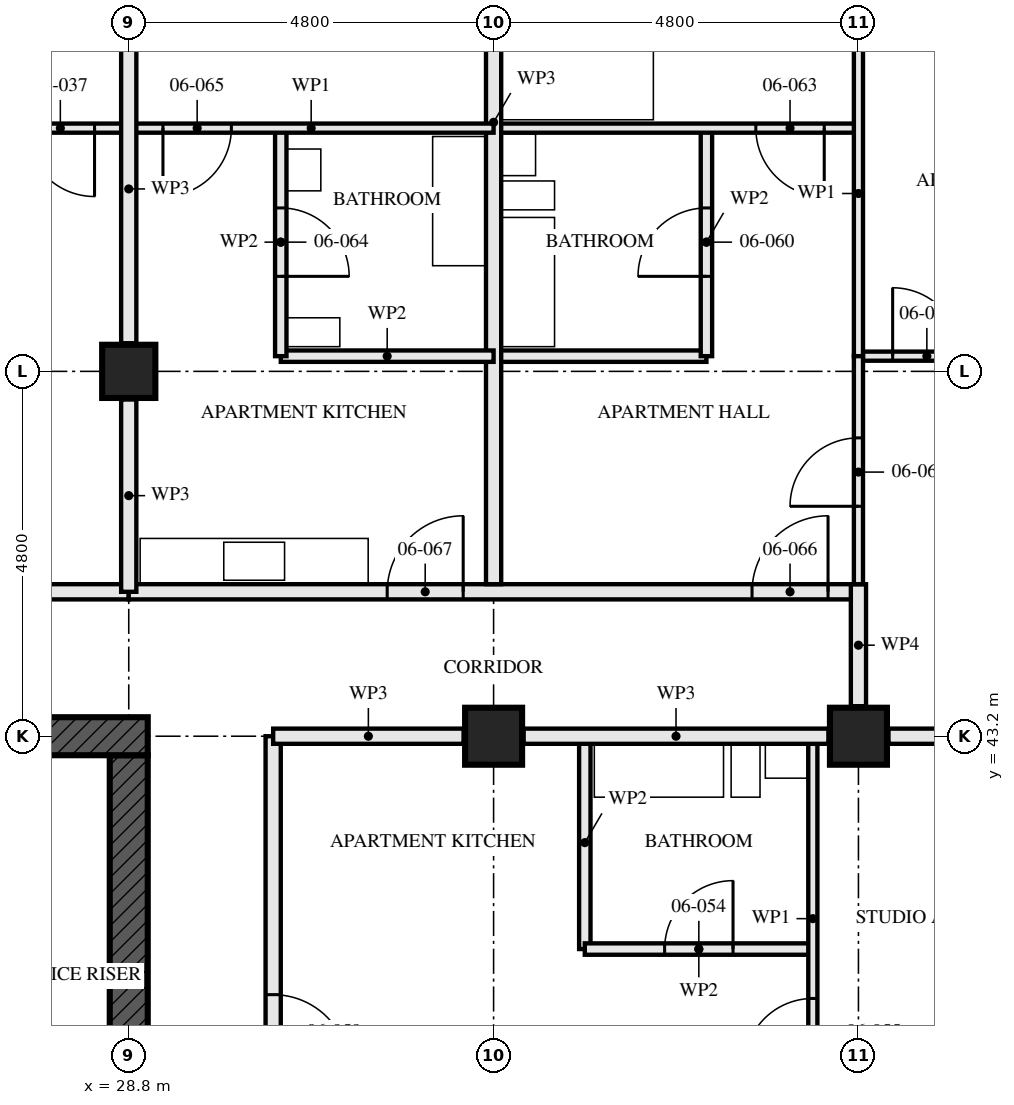
"""IFC4 building model, lengths in metres.
Left out: names, types, materials, properties, quantities, classifications, styles, units other than length and angle.
Written with IfcOpenShell. Run it as: python <this file> out.ifc"""

import sys

from ifc_helpers import new_model, si_unit, direction, frame, frame_2d, origin, origin_2d, place, context, subcontext, project, spatial, rectangle, hollow_rectangle, extrude, element, fill, save


model = new_model("IFC4")
c1 = context("Model", 3, precision=1e-05, world=origin(), true_north=direction((0.0, 1.0)))
c2 = subcontext(c1, "Body", "Model", "MODEL_VIEW")
j1 = project(units=[si_unit("LENGTHUNIT", "METRE"), si_unit("PLANEANGLEUNIT", "RADIAN")], contexts=[c1])
p1 = place(None, origin())
s1 = spatial("IfcSite", under=j1, at=p1, CompositionType="ELEMENT")
p2 = place(p1, origin())
s2 = spatial("IfcBuilding", under=s1, at=p2, CompositionType="ELEMENT")
p3 = place(p2, frame((0.0, 0.0, 27.0)))
s3 = spatial("IfcBuildingStorey", under=s2, at=p3, CompositionType="ELEMENT", Elevation=27.0)
p4 = place(p3, frame((28.8, 48.0, 0.0), z_axis=(0.0, 0.0, 1.0), x_axis=(1.0, 0.0, 0.0)))
e1 = element("IfcColumn", 1, at=p4, inside=s3, PredefinedType="COLUMN", context=c2, shape_type="SweptSolid", body=[
    extrude(hollow_rectangle(XDim=0.7, YDim=0.7, WallThickness=0.06, at=origin_2d()), origin(), (0.0, 0.0, 1.0), 3.5),
])
for number, where, z_axis, x_axis in (
    (2, (33.6, 43.2, 0.0), (0.0, 0.0, 1.0), (0.0, 1.0, 0.0)),
    (3, (38.4, 43.2, 0.0), (0.0, 0.0, 1.0), (0.0, 1.0, 0.0)),
):
    element("IfcColumn", number, at=place(p3, frame(where, z_axis=z_axis, x_axis=x_axis)), inside=s3, PredefinedType="COLUMN", context=c2, shape_type="SweptSolid", body=[
        extrude(hollow_rectangle(XDim=0.75, YDim=0.75, WallThickness=0.08, at=origin_2d()), origin(), (0.0, 0.0, 1.0), 3.5),
    ])
p5 = place(p3, frame((29.05, 43.2, -0.17), z_axis=(0.0, 0.0, 1.0), x_axis=(-1.0, 0.0, 0.0)))
e4 = element("IfcWall", 4, at=p5, inside=s3, PredefinedType="SHEAR", context=c2, shape_type="SweptSolid", body=[
    extrude(rectangle(XDim=14.9, YDim=0.5, at=frame_2d((7.45, 0.0))), origin(), (0.0, 0.0, 1.0), 3.5),
])
p6 = place(p5, frame((6.85, 0.0, 0.17)))
e5 = element("IfcOpeningElement", 5, at=p6, cuts=e4, PredefinedType="OPENING", context=c2, shape_type="SweptSolid", body=[
    extrude(rectangle(XDim=1.2, YDim=2.1, at=frame_2d((0.6, 1.05))), frame((0.0, 0.26, 0.0), z_axis=(0.0, -1.0, 0.0), x_axis=(1.0, 0.0, 0.0)), (0.0, 0.0, 1.0), 0.521),
])
p7 = place(p3, frame((28.8, 29.05, -0.17), z_axis=(0.0, 0.0, 1.0), x_axis=(0.0, 1.0, 0.0)))
e6 = element("IfcWall", 6, at=p7, inside=s3, PredefinedType="SHEAR", context=c2, shape_type="SweptSolid", body=[
    extrude(rectangle(XDim=13.9, YDim=0.5, at=frame_2d((6.95, 0.0))), origin(), (0.0, 0.0, 1.0), 3.5),
])
p8 = place(p7, frame((6.35, 0.0, 0.17)))
e7 = element("IfcOpeningElement", 7, at=p8, cuts=e6, PredefinedType="OPENING", context=c2, shape_type="SweptSolid", body=[
    extrude(rectangle(XDim=1.2, YDim=2.1, at=frame_2d((0.6, 1.05))), frame((0.0, 0.26, 0.0), z_axis=(0.0, -1.0, 0.0), x_axis=(1.0, 0.0, 0.0)), (0.0, 0.0, 1.0), 0.521),
])
p9 = place(p3, frame((28.8, 51.2, 0.0), z_axis=(0.0, 0.0, 1.0), x_axis=(-1.0, 0.0, 0.0)))
e8 = element("IfcWall", 8, at=p9, inside=s3, PredefinedType="PARTITIONING", context=c2, shape_type="SweptSolid", body=[
    extrude(rectangle(XDim=4.8, YDim=0.12, at=frame_2d((2.4, 0.0))), origin(), (0.0, 0.0, 1.0), 3.33),
])
p10 = place(p9, frame((0.45, 0.0, 0.0)))
e9 = element("IfcOpeningElement", 9, at=p10, cuts=e8, PredefinedType="OPENING", context=c2, shape_type="SweptSolid", body=[
    extrude(rectangle(XDim=0.9, YDim=2.1, at=frame_2d((0.45, 1.05))), frame((0.0, 0.071, 0.0), z_axis=(0.0, -1.0, 0.0), x_axis=(1.0, 0.0, 0.0)), (0.0, 0.0, 1.0), 0.141),
])
p11 = place(p3, frame((28.8, 45.1, 0.0), z_axis=(0.0, 0.0, 1.0), x_axis=(-1.0, 0.0, 0.0)))
e10 = element("IfcWall", 10, at=p11, inside=s3, PredefinedType="PARTITIONING", context=c2, shape_type="SweptSolid", body=[
    extrude(rectangle(XDim=14.4, YDim=0.2, at=frame_2d((7.2, 0.0))), origin(), (0.0, 0.0, 1.0), 3.33),
])
p12 = place(p11, frame((5.2, 0.0, 0.0)))
e11 = element("IfcOpeningElement", 11, at=p12, cuts=e10, PredefinedType="OPENING", context=c2, shape_type="SweptSolid", body=[
    extrude(rectangle(XDim=1.0, YDim=2.1, at=frame_2d((0.5, 1.05))), frame((0.0, 0.111, 0.0), z_axis=(0.0, -1.0, 0.0), x_axis=(1.0, 0.0, 0.0)), (0.0, 0.0, 1.0), 0.221),
])
p13 = place(p11, frame((10.0, 0.0, 0.0)))
e12 = element("IfcOpeningElement", 12, at=p13, cuts=e10, PredefinedType="OPENING", context=c2, shape_type="SweptSolid", body=[
    extrude(rectangle(XDim=1.0, YDim=2.1, at=frame_2d((0.5, 1.05))), frame((0.0, 0.111, 0.0), z_axis=(0.0, -1.0, 0.0), x_axis=(1.0, 0.0, 0.0)), (0.0, 0.0, 1.0), 0.221),
])
p14 = place(p3, frame((37.8, 40.4, 0.0), z_axis=(0.0, 0.0, 1.0), x_axis=(-1.0, 0.0, 0.0)))
e13 = element("IfcWall", 13, at=p14, inside=s3, PredefinedType="PARTITIONING", context=c2, shape_type="SweptSolid", body=[
    extrude(rectangle(XDim=3.0, YDim=0.15, at=frame_2d((1.5, 0.0))), origin(), (0.0, 0.0, 1.0), 3.33),
])
p15 = place(p14, frame((1.05, 0.0, 0.0)))
e14 = element("IfcOpeningElement", 14, at=p15, cuts=e13, PredefinedType="OPENING", context=c2, shape_type="SweptSolid", body=[
    extrude(rectangle(XDim=0.9, YDim=2.1, at=frame_2d((0.45, 1.05))), frame((0.0, 0.085, 0.0), z_axis=(0.0, -1.0, 0.0), x_axis=(1.0, 0.0, 0.0)), (0.0, 0.0, 1.0), 0.171),
])
p16 = place(p3, frame((34.8, 40.4, 0.0), z_axis=(0.0, 0.0, 1.0), x_axis=(0.0, 1.0, 0.0)))
e15 = element("IfcWall", 15, at=p16, inside=s3, PredefinedType="PARTITIONING", context=c2, shape_type="SweptSolid", body=[
    extrude(rectangle(XDim=2.8, YDim=0.15, at=frame_2d((1.4, 0.0))), origin(), (0.0, 0.0, 1.0), 3.33),
])
p17 = place(p3, frame((37.8, 38.4, 0.0), z_axis=(0.0, 0.0, 1.0), x_axis=(0.0, 1.0, 0.0)))
e16 = element("IfcWall", 16, at=p17, inside=s3, PredefinedType="PARTITIONING", context=c2, shape_type="SweptSolid", body=[
    extrude(rectangle(XDim=4.8, YDim=0.12, at=frame_2d((2.4, 0.0))), origin(), (0.0, 0.0, 1.0), 3.33),
])
p18 = place(p17, frame((0.45, 0.0, 0.0)))
e17 = element("IfcOpeningElement", 17, at=p18, cuts=e16, PredefinedType="OPENING", context=c2, shape_type="SweptSolid", body=[
    extrude(rectangle(XDim=0.9, YDim=2.1, at=frame_2d((0.45, 1.05))), frame((0.0, 0.071, 0.0), z_axis=(0.0, -1.0, 0.0), x_axis=(1.0, 0.0, 0.0)), (0.0, 0.0, 1.0), 0.141),
])
p19 = place(p3, frame((30.7, 28.8, 0.0), z_axis=(0.0, 0.0, 1.0), x_axis=(0.0, 1.0, 0.0)))
e18 = element("IfcWall", 18, at=p19, inside=s3, PredefinedType="PARTITIONING", context=c2, shape_type="SweptSolid", body=[
    extrude(rectangle(XDim=14.4, YDim=0.2, at=frame_2d((7.2, 0.0))), origin(), (0.0, 0.0, 1.0), 2.55),
])
p20 = place(p19, frame((1.4, 0.0, 0.0)))
e19 = element("IfcOpeningElement", 19, at=p20, cuts=e18, PredefinedType="OPENING", context=c2, shape_type="SweptSolid", body=[
    extrude(rectangle(XDim=1.0, YDim=2.1, at=frame_2d((0.5, 1.05))), frame((0.0, 0.111, 0.0), z_axis=(0.0, -1.0, 0.0), x_axis=(1.0, 0.0, 0.0)), (0.0, 0.0, 1.0), 0.221),
])
p21 = place(p19, frame((4.1, 0.0, 0.0)))
e20 = element("IfcOpeningElement", 20, at=p21, cuts=e18, PredefinedType="OPENING", context=c2, shape_type="SweptSolid", body=[
    extrude(rectangle(XDim=1.0, YDim=2.1, at=frame_2d((0.5, 1.05))), frame((0.0, 0.111, 0.0), z_axis=(0.0, -1.0, 0.0), x_axis=(1.0, 0.0, 0.0)), (0.0, 0.0, 1.0), 0.221),
])
p22 = place(p19, frame((5.975, 0.0, 0.0)))
e21 = element("IfcOpeningElement", 21, at=p22, cuts=e18, PredefinedType="OPENING", context=c2, shape_type="SweptSolid", body=[
    extrude(rectangle(XDim=1.0, YDim=2.1, at=frame_2d((0.5, 1.05))), frame((0.0, 0.111, 0.0), z_axis=(0.0, -1.0, 0.0), x_axis=(1.0, 0.0, 0.0)), (0.0, 0.0, 1.0), 0.221),
])
p23 = place(p19, frame((10.0, 0.0, 0.0)))
e22 = element("IfcOpeningElement", 22, at=p23, cuts=e18, PredefinedType="OPENING", context=c2, shape_type="SweptSolid", body=[
    extrude(rectangle(XDim=1.0, YDim=2.1, at=frame_2d((0.5, 1.05))), frame((0.0, 0.111, 0.0), z_axis=(0.0, -1.0, 0.0), x_axis=(1.0, 0.0, 0.0)), (0.0, 0.0, 1.0), 0.221),
])
p24 = place(p3, frame((36.4, 51.2, 0.0), z_axis=(0.0, 0.0, 1.0), x_axis=(0.0, -1.0, 0.0)))
e23 = element("IfcWall", 23, at=p24, inside=s3, PredefinedType="PARTITIONING", context=c2, shape_type="SweptSolid", body=[
    extrude(rectangle(XDim=3.0, YDim=0.15, at=frame_2d((1.5, 0.0))), origin(), (0.0, 0.0, 1.0), 3.33),
])
p25 = place(p24, frame((1.05, 0.0, 0.0)))
e24 = element("IfcOpeningElement", 24, at=p25, cuts=e23, PredefinedType="OPENING", context=c2, shape_type="SweptSolid", body=[
    extrude(rectangle(XDim=0.9, YDim=2.1, at=frame_2d((0.45, 1.05))), frame((0.0, 0.085, 0.0), z_axis=(0.0, -1.0, 0.0), x_axis=(1.0, 0.0, 0.0)), (0.0, 0.0, 1.0), 0.171),
])
p26 = place(p3, frame((36.4, 48.2, 0.0), z_axis=(0.0, 0.0, 1.0), x_axis=(-1.0, 0.0, 0.0)))
e25 = element("IfcWall", 25, at=p26, inside=s3, PredefinedType="PARTITIONING", context=c2, shape_type="SweptSolid", body=[
    extrude(rectangle(XDim=2.8, YDim=0.15, at=frame_2d((1.4, 0.0))), origin(), (0.0, 0.0, 1.0), 3.33),
])
p27 = place(p3, frame((38.4, 48.2, 0.0), z_axis=(0.0, 0.0, 1.0), x_axis=(0.0, -1.0, 0.0)))
e26 = element("IfcWall", 26, at=p27, inside=s3, PredefinedType="PARTITIONING", context=c2, shape_type="SweptSolid", body=[
    extrude(rectangle(XDim=3.0, YDim=0.12, at=frame_2d((1.5, 0.0))), origin(), (0.0, 0.0, 1.0), 2.55),
])
p28 = place(p27, frame((1.075, 0.0, 0.0)))
e27 = element("IfcOpeningElement", 27, at=p28, cuts=e26, PredefinedType="OPENING", context=c2, shape_type="SweptSolid", body=[
    extrude(rectangle(XDim=0.9, YDim=2.1, at=frame_2d((0.45, 1.05))), frame((0.0, 0.071, 0.0), z_axis=(0.0, -1.0, 0.0), x_axis=(1.0, 0.0, 0.0)), (0.0, 0.0, 1.0), 0.141),
])
p29 = place(p3, frame((42.953, 48.2, 0.0), z_axis=(0.0, 0.0, 1.0), x_axis=(-1.0, 0.0, 0.0)))
e28 = element("IfcWall", 28, at=p29, inside=s3, PredefinedType="PARTITIONING", context=c2, shape_type="SweptSolid", body=[
    extrude(rectangle(XDim=4.553, YDim=0.12, at=frame_2d((2.276, 0.0))), origin(), (0.0, 0.0, 1.0), 3.33),
])
p30 = place(p29, frame((3.203, 0.0, 0.0)))
e29 = element("IfcOpeningElement", 29, at=p30, cuts=e28, PredefinedType="OPENING", context=c2, shape_type="SweptSolid", body=[
    extrude(rectangle(XDim=0.9, YDim=2.1, at=frame_2d((0.45, 1.05))), frame((0.0, 0.071, 0.0), z_axis=(0.0, -1.0, 0.0), x_axis=(1.0, 0.0, 0.0)), (0.0, 0.0, 1.0), 0.141),
])
p31 = place(p3, frame((38.4, 51.2, 0.0), z_axis=(0.0, 0.0, 1.0), x_axis=(-1.0, 0.0, 0.0)))
e30 = element("IfcWall", 30, at=p31, inside=s3, PredefinedType="PARTITIONING", context=c2, shape_type="SweptSolid", body=[
    extrude(rectangle(XDim=4.8, YDim=0.12, at=frame_2d((2.4, 0.0))), origin(), (0.0, 0.0, 1.0), 3.33),
])
p32 = place(p31, frame((0.45, 0.0, 0.0)))
e31 = element("IfcOpeningElement", 31, at=p32, cuts=e30, PredefinedType="OPENING", context=c2, shape_type="SweptSolid", body=[
    extrude(rectangle(XDim=0.9, YDim=2.1, at=frame_2d((0.45, 1.05))), frame((0.0, 0.071, 0.0), z_axis=(0.0, -1.0, 0.0), x_axis=(1.0, 0.0, 0.0)), (0.0, 0.0, 1.0), 0.141),
])
p33 = place(p3, frame((38.4, 52.48, 0.0), z_axis=(0.0, 0.0, 1.0), x_axis=(0.0, -1.0, 0.0)))
e32 = element("IfcWall", 32, at=p33, inside=s3, PredefinedType="PARTITIONING", context=c2, shape_type="SweptSolid", body=[
    extrude(rectangle(XDim=4.28, YDim=0.12, at=frame_2d((2.14, 0.0))), origin(), (0.0, 0.0, 1.0), 3.33),
])
p34 = place(p3, frame((33.6, 57.353, 0.0), z_axis=(0.0, 0.0, 1.0), x_axis=(0.0, -1.0, 0.0)))
e33 = element("IfcWall", 33, at=p34, inside=s3, PredefinedType="PARTITIONING", context=c2, shape_type="SweptSolid", body=[
    extrude(rectangle(XDim=12.153, YDim=0.2, at=frame_2d((6.077, 0.0))), origin(), (0.0, 0.0, 1.0), 2.55),
])
p35 = place(p3, frame((30.8, 51.2, 0.0), z_axis=(0.0, 0.0, 1.0), x_axis=(0.0, -1.0, 0.0)))
e34 = element("IfcWall", 34, at=p35, inside=s3, PredefinedType="PARTITIONING", context=c2, shape_type="SweptSolid", body=[
    extrude(rectangle(XDim=3.0, YDim=0.15, at=frame_2d((1.5, 0.0))), origin(), (0.0, 0.0, 1.0), 3.33),
])
p36 = place(p35, frame((1.05, 0.0, 0.0)))
e35 = element("IfcOpeningElement", 35, at=p36, cuts=e34, PredefinedType="OPENING", context=c2, shape_type="SweptSolid", body=[
    extrude(rectangle(XDim=0.9, YDim=2.1, at=frame_2d((0.45, 1.05))), frame((0.0, 0.085, 0.0), z_axis=(0.0, -1.0, 0.0), x_axis=(1.0, 0.0, 0.0)), (0.0, 0.0, 1.0), 0.171),
])
p37 = place(p3, frame((33.6, 48.2, 0.0), z_axis=(0.0, 0.0, 1.0), x_axis=(-1.0, 0.0, 0.0)))
e36 = element("IfcWall", 36, at=p37, inside=s3, PredefinedType="PARTITIONING", context=c2, shape_type="SweptSolid", body=[
    extrude(rectangle(XDim=2.8, YDim=0.15, at=frame_2d((1.4, 0.0))), origin(), (0.0, 0.0, 1.0), 3.33),
])
p38 = place(p3, frame((33.6, 51.2, 0.0), z_axis=(0.0, 0.0, 1.0), x_axis=(-1.0, 0.0, 0.0)))
e37 = element("IfcWall", 37, at=p38, inside=s3, PredefinedType="PARTITIONING", context=c2, shape_type="SweptSolid", body=[
    extrude(rectangle(XDim=4.8, YDim=0.12, at=frame_2d((2.4, 0.0))), origin(), (0.0, 0.0, 1.0), 3.33),
])
p39 = place(p38, frame((3.45, 0.0, 0.0)))
e38 = element("IfcOpeningElement", 38, at=p39, cuts=e37, PredefinedType="OPENING", context=c2, shape_type="SweptSolid", body=[
    extrude(rectangle(XDim=0.9, YDim=2.1, at=frame_2d((0.45, 1.05))), frame((0.0, 0.071, 0.0), z_axis=(0.0, -1.0, 0.0), x_axis=(1.0, 0.0, 0.0)), (0.0, 0.0, 1.0), 0.141),
])
p40 = place(p3, frame((38.4, 45.1, 0.0), z_axis=(0.0, 0.0, 1.0), x_axis=(-1.0, 0.0, 0.0)))
e39 = element("IfcWall", 39, at=p40, inside=s3, PredefinedType="PARTITIONING", context=c2, shape_type="SweptSolid", body=[
    extrude(rectangle(XDim=9.6, YDim=0.2, at=frame_2d((4.8, 0.0))), origin(), (0.0, 0.0, 1.0), 3.33),
])
p41 = place(p40, frame((0.4, 0.0, 0.0)))
e40 = element("IfcOpeningElement", 40, at=p41, cuts=e39, PredefinedType="OPENING", context=c2, shape_type="SweptSolid", body=[
    extrude(rectangle(XDim=1.0, YDim=2.1, at=frame_2d((0.5, 1.05))), frame((0.0, 0.111, 0.0), z_axis=(0.0, -1.0, 0.0), x_axis=(1.0, 0.0, 0.0)), (0.0, 0.0, 1.0), 0.221),
])
p42 = place(p40, frame((5.2, 0.0, 0.0)))
e41 = element("IfcOpeningElement", 41, at=p42, cuts=e39, PredefinedType="OPENING", context=c2, shape_type="SweptSolid", body=[
    extrude(rectangle(XDim=1.0, YDim=2.1, at=frame_2d((0.5, 1.05))), frame((0.0, 0.111, 0.0), z_axis=(0.0, -1.0, 0.0), x_axis=(1.0, 0.0, 0.0)), (0.0, 0.0, 1.0), 0.221),
])
p43 = place(p3, frame((38.4, 45.2, 0.0), z_axis=(0.0, 0.0, 1.0), x_axis=(0.0, -1.0, 0.0)))
e42 = element("IfcWall", 42, at=p43, inside=s3, PredefinedType="PARTITIONING", context=c2, shape_type="SweptSolid", body=[
    extrude(rectangle(XDim=1.605, YDim=0.2, at=frame_2d((0.802, 0.0))), origin(), (0.0, 0.0, 1.0), 3.33),
])
p44 = place(p3, frame((28.8, 45.1, 0.0), z_axis=(0.0, 0.0, 1.0), x_axis=(0.0, 1.0, 0.0)))
e43 = element("IfcWall", 43, at=p44, inside=s3, PredefinedType="PARTITIONING", context=c2, shape_type="SweptSolid", body=[
    extrude(rectangle(XDim=2.53, YDim=0.2, at=frame_2d((1.265, 0.0))), origin(), (0.0, 0.0, 1.0), 2.32),
])
p45 = place(p3, frame((28.8, 48.37, 0.0), z_axis=(0.0, 0.0, 1.0), x_axis=(0.0, 1.0, 0.0)))
e44 = element("IfcWall", 44, at=p45, inside=s3, PredefinedType="PARTITIONING", context=c2, shape_type="SweptSolid", body=[
    extrude(rectangle(XDim=4.06, YDim=0.2, at=frame_2d((2.03, 0.0))), origin(), (0.0, 0.0, 1.0), 2.32),
])
p46 = place(p3, frame((42.896, 43.2, 0.0), z_axis=(0.0, 0.0, 1.0), x_axis=(-1.0, 0.0, 0.0)))
e45 = element("IfcWall", 45, at=p46, inside=s3, PredefinedType="PARTITIONING", context=c2, shape_type="SweptSolid", body=[
    extrude(rectangle(XDim=4.101, YDim=0.2, at=frame_2d((2.05, 0.0))), origin(), (0.0, 0.0, 1.0), 2.32),
])
p47 = place(p3, frame((38.005, 43.2, 0.0), z_axis=(0.0, 0.0, 1.0), x_axis=(-1.0, 0.0, 0.0)))
e46 = element("IfcWall", 46, at=p47, inside=s3, PredefinedType="PARTITIONING", context=c2, shape_type="SweptSolid", body=[
    extrude(rectangle(XDim=4.01, YDim=0.2, at=frame_2d((2.005, 0.0))), origin(), (0.0, 0.0, 1.0), 2.32),
])
p48 = place(p3, frame((33.205, 43.2, 0.0), z_axis=(0.0, 0.0, 1.0), x_axis=(-1.0, 0.0, 0.0)))
e47 = element("IfcWall", 47, at=p48, inside=s3, PredefinedType="PARTITIONING", context=c2, shape_type="SweptSolid", body=[
    extrude(rectangle(XDim=2.505, YDim=0.2, at=frame_2d((1.252, 0.0))), origin(), (0.0, 0.0, 1.0), 2.32),
])
p49 = place(p10, origin())
e48 = element("IfcDoor", 48, at=p49, inside=s3, OperationType="SINGLE_SWING_RIGHT", PredefinedType="DOOR", context=c2, shape_type="SweptSolid", body=[
    extrude(rectangle(XDim=0.9, YDim=2.1, at=frame_2d((0.45, 1.05))), frame((0.0, 0.022, 0.0), z_axis=(0.0, -1.0, 0.0), x_axis=(1.0, 0.0, 0.0)), (0.0, 0.0, 1.0), 0.044),
])
fill(e9, e48)
p50 = place(p15, frame((0.9, 0.0, 0.0), z_axis=(0.0, 0.0, 1.0), x_axis=(-1.0, 0.0, 0.0)))
e49 = element("IfcDoor", 49, at=p50, inside=s3, OperationType="SINGLE_SWING_LEFT", PredefinedType="DOOR", context=c2, shape_type="SweptSolid", body=[
    extrude(rectangle(XDim=0.9, YDim=2.1, at=frame_2d((0.45, 1.05))), frame((0.0, 0.022, 0.0), z_axis=(0.0, -1.0, 0.0), x_axis=(1.0, 0.0, 0.0)), (0.0, 0.0, 1.0), 0.044),
])
fill(e14, e49)
p51 = place(p18, origin())
e50 = element("IfcDoor", 50, at=p51, inside=s3, OperationType="SINGLE_SWING_RIGHT", PredefinedType="DOOR", context=c2, shape_type="SweptSolid", body=[
    extrude(rectangle(XDim=0.9, YDim=2.1, at=frame_2d((0.45, 1.05))), frame((0.0, 0.022, 0.0), z_axis=(0.0, -1.0, 0.0), x_axis=(1.0, 0.0, 0.0)), (0.0, 0.0, 1.0), 0.044),
])
fill(e17, e50)
p52 = place(p23, frame((1.0, 0.0, 0.0), z_axis=(0.0, 0.0, 1.0), x_axis=(-1.0, 0.0, 0.0)))
e51 = element("IfcDoor", 51, at=p52, inside=s3, OperationType="SINGLE_SWING_LEFT", PredefinedType="DOOR", context=c2, shape_type="SweptSolid", body=[
    extrude(rectangle(XDim=1.0, YDim=2.1, at=frame_2d((0.5, 1.05))), frame((0.0, 0.027, 0.0), z_axis=(0.0, -1.0, 0.0), x_axis=(1.0, 0.0, 0.0)), (0.0, 0.0, 1.0), 0.054),
])
fill(e22, e51)
p53 = place(p25, frame((0.9, 0.0, 0.0), z_axis=(0.0, 0.0, 1.0), x_axis=(-1.0, 0.0, 0.0)))
e52 = element("IfcDoor", 52, at=p53, inside=s3, OperationType="SINGLE_SWING_RIGHT", PredefinedType="DOOR", context=c2, shape_type="SweptSolid", body=[
    extrude(rectangle(XDim=0.9, YDim=2.1, at=frame_2d((0.45, 1.05))), frame((0.0, 0.022, 0.0), z_axis=(0.0, -1.0, 0.0), x_axis=(1.0, 0.0, 0.0)), (0.0, 0.0, 1.0), 0.044),
])
fill(e24, e52)
p54 = place(p28, frame((0.9, 0.0, 0.0), z_axis=(0.0, 0.0, 1.0), x_axis=(-1.0, 0.0, 0.0)))
e53 = element("IfcDoor", 53, at=p54, inside=s3, OperationType="SINGLE_SWING_RIGHT", PredefinedType="DOOR", context=c2, shape_type="SweptSolid", body=[
    extrude(rectangle(XDim=0.9, YDim=2.1, at=frame_2d((0.45, 1.05))), frame((0.0, 0.022, 0.0), z_axis=(0.0, -1.0, 0.0), x_axis=(1.0, 0.0, 0.0)), (0.0, 0.0, 1.0), 0.044),
])
fill(e27, e53)
p55 = place(p30, frame((0.9, 0.0, 0.0), z_axis=(0.0, 0.0, 1.0), x_axis=(-1.0, 0.0, 0.0)))
e54 = element("IfcDoor", 54, at=p55, inside=s3, OperationType="SINGLE_SWING_RIGHT", PredefinedType="DOOR", context=c2, shape_type="SweptSolid", body=[
    extrude(rectangle(XDim=0.9, YDim=2.1, at=frame_2d((0.45, 1.05))), frame((0.0, 0.022, 0.0), z_axis=(0.0, -1.0, 0.0), x_axis=(1.0, 0.0, 0.0)), (0.0, 0.0, 1.0), 0.044),
])
fill(e29, e54)
p56 = place(p32, origin())
e55 = element("IfcDoor", 55, at=p56, inside=s3, OperationType="SINGLE_SWING_RIGHT", PredefinedType="DOOR", context=c2, shape_type="SweptSolid", body=[
    extrude(rectangle(XDim=0.9, YDim=2.1, at=frame_2d((0.45, 1.05))), frame((0.0, 0.022, 0.0), z_axis=(0.0, -1.0, 0.0), x_axis=(1.0, 0.0, 0.0)), (0.0, 0.0, 1.0), 0.044),
])
fill(e31, e55)
p57 = place(p36, origin())
e56 = element("IfcDoor", 56, at=p57, inside=s3, OperationType="SINGLE_SWING_LEFT", PredefinedType="DOOR", context=c2, shape_type="SweptSolid", body=[
    extrude(rectangle(XDim=0.9, YDim=2.1, at=frame_2d((0.45, 1.05))), frame((0.0, 0.022, 0.0), z_axis=(0.0, -1.0, 0.0), x_axis=(1.0, 0.0, 0.0)), (0.0, 0.0, 1.0), 0.044),
])
fill(e35, e56)
p58 = place(p39, origin())
e57 = element("IfcDoor", 57, at=p58, inside=s3, OperationType="SINGLE_SWING_LEFT", PredefinedType="DOOR", context=c2, shape_type="SweptSolid", body=[
    extrude(rectangle(XDim=0.9, YDim=2.1, at=frame_2d((0.45, 1.05))), frame((0.0, 0.022, 0.0), z_axis=(0.0, -1.0, 0.0), x_axis=(1.0, 0.0, 0.0)), (0.0, 0.0, 1.0), 0.044),
])
fill(e38, e57)
p59 = place(p41, frame((1.0, 0.0, 0.0), z_axis=(0.0, 0.0, 1.0), x_axis=(-1.0, 0.0, 0.0)))
e58 = element("IfcDoor", 58, at=p59, inside=s3, OperationType="SINGLE_SWING_LEFT", PredefinedType="DOOR", context=c2, shape_type="SweptSolid", body=[
    extrude(rectangle(XDim=1.0, YDim=2.1, at=frame_2d((0.5, 1.05))), frame((0.0, 0.027, 0.0), z_axis=(0.0, -1.0, 0.0), x_axis=(1.0, 0.0, 0.0)), (0.0, 0.0, 1.0), 0.054),
])
fill(e40, e58)
p60 = place(p42, frame((1.0, 0.0, 0.0), z_axis=(0.0, 0.0, 1.0), x_axis=(-1.0, 0.0, 0.0)))
e59 = element("IfcDoor", 59, at=p60, inside=s3, OperationType="SINGLE_SWING_LEFT", PredefinedType="DOOR", context=c2, shape_type="SweptSolid", body=[
    extrude(rectangle(XDim=1.0, YDim=2.1, at=frame_2d((0.5, 1.05))), frame((0.0, 0.027, 0.0), z_axis=(0.0, -1.0, 0.0), x_axis=(1.0, 0.0, 0.0)), (0.0, 0.0, 1.0), 0.054),
])
fill(e41, e59)
save(model, sys.argv[1])
